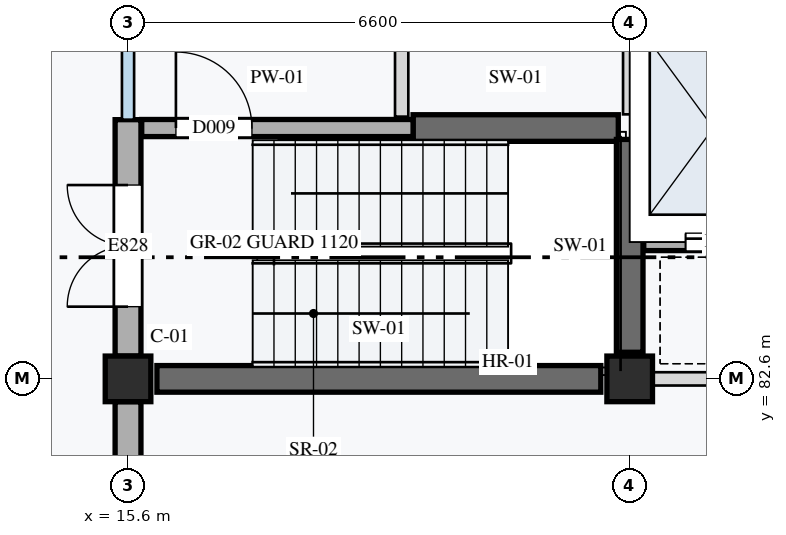
"""IFC4 building model, lengths in metres.
Left out: names, types, materials, properties, quantities, classifications, styles, units other than length and angle.
Written with IfcOpenShell. Run it as: python <this file> out.ifc"""

import sys

from ifc_helpers import new_model, si_unit, direction, frame, frame_2d, origin, origin_2d, place, context, subcontext, project, spatial, rectangle, extrude, element, fill, save


model = new_model("IFC4")
c1 = context("Model", 3, precision=1e-05, world=origin(), true_north=direction((0.0, 1.0)))
c2 = subcontext(c1, "Body", "Model", "MODEL_VIEW")
j1 = project(units=[si_unit("LENGTHUNIT", "METRE"), si_unit("PLANEANGLEUNIT", "RADIAN")], contexts=[c1])
p1 = place(None, origin())
s1 = spatial("IfcSite", under=j1, at=p1, CompositionType="ELEMENT")
p2 = place(p1, origin())
s2 = spatial("IfcBuilding", under=s1, at=p2, CompositionType="ELEMENT")
p3 = place(p2, origin())
s3 = spatial("IfcBuildingStorey", under=s2, at=p3, CompositionType="ELEMENT", Elevation=0.0)
for number, where, z_axis, x_axis in (
    (1, (15.6, 82.6, 0.0), (0.0, 0.0, 1.0), (1.0, 0.0, 0.0)),
    (2, (22.2, 82.6, 0.0), (0.0, 0.0, 1.0), (1.0, 0.0, 0.0)),
):
    element("IfcColumn", number, at=place(p3, frame(where, z_axis=z_axis, x_axis=x_axis)), inside=s3, PredefinedType="COLUMN", context=c2, shape_type="SweptSolid", body=[
        extrude(rectangle(XDim=0.6, YDim=0.6, at=origin_2d()), origin(), (0.0, 0.0, 1.0), 4.2),
    ])
p4 = place(p3, frame((15.98, 82.6, 0.0), z_axis=(0.0, 0.0, 1.0), x_axis=(1.0, 0.0, 0.0)))
e3 = element("IfcWall", 3, at=p4, inside=s3, PredefinedType="SHEAR", context=c2, shape_type="SweptSolid", body=[
    extrude(rectangle(XDim=5.84, YDim=0.35, at=frame_2d((2.92, 0.0))), origin(), (0.0, 0.0, 1.0), 3.92),
])
p5 = place(p3, frame((19.35, 85.9, 0.0), z_axis=(0.0, 0.0, 1.0), x_axis=(1.0, 0.0, 0.0)))
e4 = element("IfcWall", 4, at=p5, inside=s3, PredefinedType="SHEAR", context=c2, shape_type="SweptSolid", body=[
    extrude(rectangle(XDim=2.7, YDim=0.35, at=frame_2d((1.35, 0.0))), origin(), (0.0, 0.0, 1.0), 3.92),
])
p6 = place(p3, frame((22.2, 82.95, 0.0), z_axis=(0.0, 0.0, 1.0), x_axis=(0.0, 1.0, 0.0)))
e5 = element("IfcWall", 5, at=p6, inside=s3, PredefinedType="SHEAR", context=c2, shape_type="SweptSolid", body=[
    extrude(rectangle(XDim=2.8, YDim=0.35, at=frame_2d((1.4, 0.0))), origin(), (0.0, 0.0, 1.0), 3.92),
])
p7 = place(p3, frame((15.6, 76.375, 0.0), z_axis=(0.0, 0.0, 1.0), x_axis=(0.0, 1.0, 0.0)))
e6 = element("IfcWall", 6, at=p7, inside=s3, PredefinedType="STANDARD", context=c2, shape_type="SweptSolid", body=[
    extrude(rectangle(XDim=5.925, YDim=0.34, at=frame_2d((2.962, 0.0))), origin(), (0.0, 0.0, 1.0), 3.65),
])
p8 = place(p3, frame((15.6, 82.9, 0.0), z_axis=(0.0, 0.0, 1.0), x_axis=(0.0, 1.0, 0.0)))
e7 = element("IfcWall", 7, at=p8, inside=s3, PredefinedType="STANDARD", context=c2, shape_type="SweptSolid", body=[
    extrude(rectangle(XDim=3.11, YDim=0.34, at=frame_2d((1.555, 0.0))), origin(), (0.0, 0.0, 1.0), 3.65),
])
p9 = place(p8, frame((0.65, 0.0, 0.0)))
e8 = element("IfcOpeningElement", 8, at=p9, cuts=e7, PredefinedType="OPENING", context=c2, shape_type="SweptSolid", body=[
    extrude(rectangle(XDim=1.6, YDim=2.4, at=frame_2d((0.8, 1.2))), frame((0.0, 0.18, 0.0), z_axis=(0.0, -1.0, 0.0), x_axis=(1.0, 0.0, 0.0)), (0.0, 0.0, 1.0), 0.36),
])
p10 = place(p3, frame((15.78, 85.9, 0.0), z_axis=(0.0, 0.0, 1.0), x_axis=(1.0, 0.0, 0.0)))
e9 = element("IfcWall", 9, at=p10, inside=s3, PredefinedType="STANDARD", context=c2, shape_type="SweptSolid", body=[
    extrude(rectangle(XDim=3.57, YDim=0.225, at=frame_2d((1.785, 0.0))), origin(), (0.0, 0.0, 1.0), 3.92),
])
p11 = place(p10, frame((0.45, 0.0, 0.0)))
e10 = element("IfcOpeningElement", 10, at=p11, cuts=e9, PredefinedType="OPENING", context=c2, shape_type="SweptSolid", body=[
    extrude(rectangle(XDim=1.0, YDim=2.1, at=frame_2d((0.5, 1.05))), frame((0.0, 0.123, 0.0), z_axis=(0.0, -1.0, 0.0), x_axis=(1.0, 0.0, 0.0)), (0.0, 0.0, 1.0), 0.245),
])
p12 = place(p3, frame((19.2, 86.05, 0.0), z_axis=(0.0, 0.0, 1.0), x_axis=(0.0, 1.0, 0.0)))
e11 = element("IfcWall", 11, at=p12, inside=s3, PredefinedType="PARTITIONING", context=c2, shape_type="SweptSolid", body=[
    extrude(rectangle(XDim=3.0, YDim=0.175, at=frame_2d((1.5, 0.0))), origin(), (0.0, 0.0, 1.0), 3.92),
])
p13 = place(p12, frame((1.65, 0.0, 0.0)))
e12 = element("IfcOpeningElement", 12, at=p13, cuts=e11, PredefinedType="OPENING", context=c2, shape_type="SweptSolid", body=[
    extrude(rectangle(XDim=1.0, YDim=2.16, at=frame_2d((0.5, 1.08))), frame((0.0, 0.097, 0.0), z_axis=(0.0, -1.0, 0.0), x_axis=(1.0, 0.0, 0.0)), (0.0, 0.0, 1.0), 0.195),
])
p14 = place(p3, frame((22.2, 86.08, 0.0), z_axis=(0.0, 0.0, 1.0), x_axis=(0.0, 1.0, 0.0)))
e13 = element("IfcWall", 13, at=p14, inside=s3, PredefinedType="PARTITIONING", context=c2, shape_type="SweptSolid", body=[
    extrude(rectangle(XDim=1.19, YDim=0.175, at=frame_2d((0.595, 0.0))), origin(), (0.0, 0.0, 1.0), 3.92),
])
p15 = place(p3, frame((22.385, 84.4, 0.0), z_axis=(0.0, 0.0, 1.0), x_axis=(1.0, 0.0, 0.0)))
e14 = element("IfcWall", 14, at=p15, inside=s3, PredefinedType="STANDARD", context=c2, shape_type="SweptSolid", body=[
    extrude(rectangle(XDim=2.015, YDim=0.225, at=frame_2d((1.007, 0.0))), origin(), (0.0, 0.0, 1.0), 3.92),
])
p16 = place(p15, frame((0.55, 0.0, 0.0)))
e15 = element("IfcOpeningElement", 15, at=p16, cuts=e14, PredefinedType="OPENING", context=c2, shape_type="SweptSolid", body=[
    extrude(rectangle(XDim=1.1, YDim=2.1, at=frame_2d((0.55, 1.05))), frame((0.0, 0.123, 0.0), z_axis=(0.0, -1.0, 0.0), x_axis=(1.0, 0.0, 0.0)), (0.0, 0.0, 1.0), 0.245),
])
p17 = place(p3, frame((22.2, 82.6, 0.0), z_axis=(0.0, 0.0, 1.0), x_axis=(1.0, 0.0, 0.0)))
e16 = element("IfcWall", 16, at=p17, inside=s3, PredefinedType="PARTITIONING", context=c2, shape_type="SweptSolid", body=[
    extrude(rectangle(XDim=6.6, YDim=0.175, at=frame_2d((3.3, 0.0))), origin(), (0.0, 0.0, 1.0), 3.55),
])
p18 = place(p17, frame((2.4, 0.0, 0.0)))
e17 = element("IfcOpeningElement", 17, at=p18, cuts=e16, PredefinedType="OPENING", context=c2, shape_type="SweptSolid", body=[
    extrude(rectangle(XDim=1.6, YDim=2.2, at=frame_2d((0.8, 1.1))), frame((0.0, 0.097, 0.0), z_axis=(0.0, -1.0, 0.0), x_axis=(1.0, 0.0, 0.0)), (0.0, 0.0, 1.0), 0.195),
])
p19 = place(p9, origin())
e18 = element("IfcDoor", 18, at=p19, inside=s3, OperationType="DOUBLE_DOOR_SINGLE_SWING", PredefinedType="DOOR", context=c2, shape_type="SweptSolid", body=[
    extrude(rectangle(XDim=1.6, YDim=2.4, at=frame_2d((0.8, 1.2))), frame((0.0, 0.025, 0.0), z_axis=(0.0, -1.0, 0.0), x_axis=(1.0, 0.0, 0.0)), (0.0, 0.0, 1.0), 0.05),
])
fill(e8, e18)
p20 = place(p11, origin())
e19 = element("IfcDoor", 19, at=p20, inside=s3, OperationType="SINGLE_SWING_LEFT", PredefinedType="DOOR", context=c2, shape_type="SweptSolid", body=[
    extrude(rectangle(XDim=1.0, YDim=2.1, at=frame_2d((0.5, 1.05))), frame((0.0, 0.025, 0.0), z_axis=(0.0, -1.0, 0.0), x_axis=(1.0, 0.0, 0.0)), (0.0, 0.0, 1.0), 0.05),
])
fill(e10, e19)
p21 = place(p16, origin())
e20 = element("IfcDoor", 20, at=p21, inside=s3, OperationType="DOUBLE_DOOR_SLIDING", PredefinedType="DOOR", context=c2, shape_type="SweptSolid", body=[
    extrude(rectangle(XDim=1.1, YDim=2.1, at=frame_2d((0.55, 1.05))), frame((0.0, 0.025, 0.0), z_axis=(0.0, -1.0, 0.0), x_axis=(1.0, 0.0, 0.0)), (0.0, 0.0, 1.0), 0.05),
])
fill(e15, e20)
save(model, sys.argv[1])
